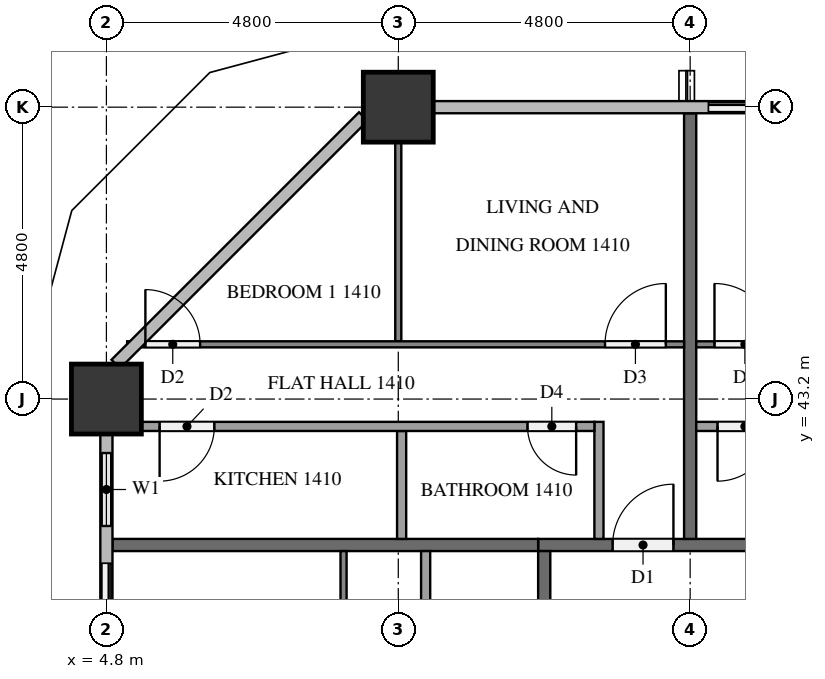
"""IFC4 building model, lengths in metres.
Left out: names, types, materials, properties, quantities, classifications, styles, units other than length and angle.
Written with IfcOpenShell. Run it as: python <this file> out.ifc"""

import sys

from ifc_helpers import new_model, si_unit, direction, frame, frame_2d, origin, origin_2d, place, context, subcontext, project, spatial, rectangle, extrude, element, fill, save


model = new_model("IFC4")
c1 = context("Model", 3, precision=1e-05, world=origin(), true_north=direction((0.0, 1.0)))
c2 = subcontext(c1, "Body", "Model", "MODEL_VIEW")
j1 = project(units=[si_unit("LENGTHUNIT", "METRE"), si_unit("PLANEANGLEUNIT", "RADIAN")], contexts=[c1])
p1 = place(None, origin())
s1 = spatial("IfcSite", under=j1, at=p1, CompositionType="ELEMENT")
p2 = place(p1, origin())
s2 = spatial("IfcBuilding", under=s1, at=p2, CompositionType="ELEMENT")
p3 = place(p2, frame((0.0, 0.0, 59.3)))
s3 = spatial("IfcBuildingStorey", under=s2, at=p3, CompositionType="ELEMENT", Elevation=59.3)
for number, where, z_axis, x_axis in (
    (1, (9.6, 48.0, 0.0), (0.0, 0.0, 1.0), (1.0, 0.0, 0.0)),
    (2, (4.8, 43.2, 0.0), (0.0, 0.0, 1.0), (1.0, 0.0, 0.0)),
):
    element("IfcColumn", number, at=place(p3, frame(where, z_axis=z_axis, x_axis=x_axis)), inside=s3, PredefinedType="COLUMN", context=c2, shape_type="SweptSolid", body=[
        extrude(rectangle(XDim=1.15, YDim=1.15, at=origin_2d()), origin(), (0.0, 0.0, 1.0), 3.2),
    ])
p4 = place(p3, frame((16.8, 48.0, 0.0), z_axis=(0.0, 0.0, 1.0), x_axis=(-1.0, 0.0, 0.0)))
e3 = element("IfcWall", 3, at=p4, inside=s3, PredefinedType="SOLIDWALL", context=c2, shape_type="SweptSolid", body=[
    extrude(rectangle(XDim=2.4, YDim=0.15, at=frame_2d((1.2, 0.0))), origin(), (0.0, 0.0, 1.0), 3.2),
])
p5 = place(p4, frame((0.3, 0.0, 0.0)))
e4 = element("IfcOpeningElement", 4, at=p5, cuts=e3, PredefinedType="OPENING", context=c2, shape_type="SweptSolid", body=[
    extrude(rectangle(XDim=1.8, YDim=2.4, at=frame_2d((0.9, 1.2))), frame((0.0, 0.085, 0.0), z_axis=(0.0, -1.0, 0.0), x_axis=(1.0, 0.0, 0.0)), (0.0, 0.0, 1.0), 0.17),
])
p6 = place(p3, frame((4.8, 42.625, 0.0), z_axis=(0.0, 0.0, 1.0), x_axis=(0.0, -1.0, 0.0)))
e5 = element("IfcWall", 5, at=p6, inside=s3, PredefinedType="SOLIDWALL", context=c2, shape_type="SweptSolid", body=[
    extrude(rectangle(XDim=4.225, YDim=0.15, at=frame_2d((2.113, 0.0))), origin(), (0.0, 0.0, 1.0), 3.2),
])
p7 = place(p6, frame((0.312, 0.0, 0.9)))
e6 = element("IfcOpeningElement", 6, at=p7, cuts=e5, PredefinedType="OPENING", context=c2, shape_type="SweptSolid", body=[
    extrude(rectangle(XDim=1.2, YDim=1.4, at=frame_2d((0.6, 0.7))), frame((0.0, 0.085, 0.0), z_axis=(0.0, -1.0, 0.0), x_axis=(1.0, 0.0, 0.0)), (0.0, 0.0, 1.0), 0.17),
])
p8 = place(p6, frame((2.125, 0.0, 0.0)))
e7 = element("IfcOpeningElement", 7, at=p8, cuts=e5, PredefinedType="OPENING", context=c2, shape_type="SweptSolid", body=[
    extrude(rectangle(XDim=1.8, YDim=2.4, at=frame_2d((0.9, 1.2))), frame((0.0, 0.085, 0.0), z_axis=(0.0, -1.0, 0.0), x_axis=(1.0, 0.0, 0.0)), (0.0, 0.0, 1.0), 0.17),
])
p9 = place(p3, frame((11.9, 40.8, 0.0), z_axis=(0.0, 0.0, 1.0), x_axis=(1.0, 0.0, 0.0)))
e8 = element("IfcWall", 8, at=p9, inside=s3, PredefinedType="PARTITIONING", context=c2, shape_type="SweptSolid", body=[
    extrude(rectangle(XDim=38.6, YDim=0.2, at=frame_2d((19.3, 0.0))), origin(), (0.0, 0.0, 1.0), 3.2),
])
p10 = place(p9, frame((36.375, 0.0, 0.0)))
e9 = element("IfcOpeningElement", 9, at=p10, cuts=e8, PredefinedType="OPENING", context=c2, shape_type="SweptSolid", body=[
    extrude(rectangle(XDim=1.0, YDim=2.1, at=frame_2d((0.5, 1.05))), frame((0.0, 0.11, 0.0), z_axis=(0.0, -1.0, 0.0), x_axis=(1.0, 0.0, 0.0)), (0.0, 0.0, 1.0), 0.22),
])
p11 = place(p9, frame((17.125, 0.0, 0.0)))
e10 = element("IfcOpeningElement", 10, at=p11, cuts=e8, PredefinedType="OPENING", context=c2, shape_type="SweptSolid", body=[
    extrude(rectangle(XDim=1.1, YDim=2.1, at=frame_2d((0.55, 1.05))), frame((0.0, 0.11, 0.0), z_axis=(0.0, -1.0, 0.0), x_axis=(1.0, 0.0, 0.0)), (0.0, 0.0, 1.0), 0.22),
])
p12 = place(p9, frame((15.625, 0.0, 0.0)))
e11 = element("IfcOpeningElement", 11, at=p12, cuts=e8, PredefinedType="OPENING", context=c2, shape_type="SweptSolid", body=[
    extrude(rectangle(XDim=1.0, YDim=2.1, at=frame_2d((0.5, 1.05))), frame((0.0, 0.11, 0.0), z_axis=(0.0, -1.0, 0.0), x_axis=(1.0, 0.0, 0.0)), (0.0, 0.0, 1.0), 0.22),
])
p13 = place(p9, frame((1.225, 0.0, 0.0)))
e12 = element("IfcOpeningElement", 12, at=p13, cuts=e8, PredefinedType="OPENING", context=c2, shape_type="SweptSolid", body=[
    extrude(rectangle(XDim=1.0, YDim=2.1, at=frame_2d((0.5, 1.05))), frame((0.0, 0.11, 0.0), z_axis=(0.0, -1.0, 0.0), x_axis=(1.0, 0.0, 0.0)), (0.0, 0.0, 1.0), 0.22),
])
p14 = place(p3, frame((12.0, 12.1, 0.0), z_axis=(0.0, 0.0, 1.0), x_axis=(0.0, 1.0, 0.0)))
e13 = element("IfcWall", 13, at=p14, inside=s3, PredefinedType="PARTITIONING", context=c2, shape_type="SweptSolid", body=[
    extrude(rectangle(XDim=28.6, YDim=0.2, at=frame_2d((14.3, 0.0))), origin(), (0.0, 0.0, 1.0), 3.2),
])
p15 = place(p14, frame((19.375, 0.0, 0.0)))
e14 = element("IfcOpeningElement", 14, at=p15, cuts=e13, PredefinedType="OPENING", context=c2, shape_type="SweptSolid", body=[
    extrude(rectangle(XDim=1.0, YDim=2.1, at=frame_2d((0.5, 1.05))), frame((0.0, 0.11, 0.0), z_axis=(0.0, -1.0, 0.0), x_axis=(1.0, 0.0, 0.0)), (0.0, 0.0, 1.0), 0.22),
])
p16 = place(p14, frame((12.175, 0.0, 0.0)))
e15 = element("IfcOpeningElement", 15, at=p16, cuts=e13, PredefinedType="OPENING", context=c2, shape_type="SweptSolid", body=[
    extrude(rectangle(XDim=1.0, YDim=2.1, at=frame_2d((0.5, 1.05))), frame((0.0, 0.11, 0.0), z_axis=(0.0, -1.0, 0.0), x_axis=(1.0, 0.0, 0.0)), (0.0, 0.0, 1.0), 0.22),
])
p17 = place(p14, frame((2.575, 0.0, 0.0)))
e16 = element("IfcOpeningElement", 16, at=p17, cuts=e13, PredefinedType="OPENING", context=c2, shape_type="SweptSolid", body=[
    extrude(rectangle(XDim=1.0, YDim=2.1, at=frame_2d((0.5, 1.05))), frame((0.0, 0.11, 0.0), z_axis=(0.0, -1.0, 0.0), x_axis=(1.0, 0.0, 0.0)), (0.0, 0.0, 1.0), 0.22),
])
p18 = place(p14, frame((1.025, 0.0, 0.0)))
e17 = element("IfcOpeningElement", 17, at=p18, cuts=e13, PredefinedType="OPENING", context=c2, shape_type="SweptSolid", body=[
    extrude(rectangle(XDim=1.0, YDim=2.1, at=frame_2d((0.5, 1.05))), frame((0.0, 0.11, 0.0), z_axis=(0.0, -1.0, 0.0), x_axis=(1.0, 0.0, 0.0)), (0.0, 0.0, 1.0), 0.22),
])
for number, where, z_axis, x_axis in (
    (18, (14.4, 47.9, 0.0), (0.0, 0.0, 1.0), (0.0, -1.0, 0.0)),
    (19, (4.9, 40.8, 0.0), (0.0, 0.0, 1.0), (1.0, 0.0, 0.0)),
):
    element("IfcWall", number, at=place(p3, frame(where, z_axis=z_axis, x_axis=x_axis)), inside=s3, PredefinedType="PARTITIONING", context=c2, shape_type="SweptSolid", body=[
        extrude(rectangle(XDim=7.0, YDim=0.2, at=frame_2d((3.5, 0.0))), origin(), (0.0, 0.0, 1.0), 3.2),
    ])
p19 = place(p3, frame((14.5, 44.1, 0.0), z_axis=(0.0, 0.0, 1.0), x_axis=(1.0, 0.0, 0.0)))
e20 = element("IfcWall", 20, at=p19, inside=s3, PredefinedType="PARTITIONING", context=c2, shape_type="SweptSolid", body=[
    extrude(rectangle(XDim=14.2, YDim=0.1, at=frame_2d((7.1, 0.0))), origin(), (0.0, 0.0, 1.0), 3.2),
])
p20 = place(p19, frame((9.85, 0.0, 0.0)))
e21 = element("IfcOpeningElement", 21, at=p20, cuts=e20, PredefinedType="OPENING", context=c2, shape_type="SweptSolid", body=[
    extrude(rectangle(XDim=0.9, YDim=2.1, at=frame_2d((0.45, 1.05))), frame((0.0, 0.06, 0.0), z_axis=(0.0, -1.0, 0.0), x_axis=(1.0, 0.0, 0.0)), (0.0, 0.0, 1.0), 0.12),
])
p21 = place(p19, frame((8.25, 0.0, 0.0)))
e22 = element("IfcOpeningElement", 22, at=p21, cuts=e20, PredefinedType="OPENING", context=c2, shape_type="SweptSolid", body=[
    extrude(rectangle(XDim=0.9, YDim=2.1, at=frame_2d((0.45, 1.05))), frame((0.0, 0.06, 0.0), z_axis=(0.0, -1.0, 0.0), x_axis=(1.0, 0.0, 0.0)), (0.0, 0.0, 1.0), 0.12),
])
p22 = place(p19, frame((0.3, 0.0, 0.0)))
e23 = element("IfcOpeningElement", 23, at=p22, cuts=e20, PredefinedType="OPENING", context=c2, shape_type="SweptSolid", body=[
    extrude(rectangle(XDim=1.0, YDim=2.1, at=frame_2d((0.5, 1.05))), frame((0.0, 0.06, 0.0), z_axis=(0.0, -1.0, 0.0), x_axis=(1.0, 0.0, 0.0)), (0.0, 0.0, 1.0), 0.12),
])
p23 = place(p3, frame((27.225, 42.75, 0.0), z_axis=(0.0, 0.0, 1.0), x_axis=(-1.0, 0.0, 0.0)))
e24 = element("IfcWall", 24, at=p23, inside=s3, PredefinedType="PARTITIONING", context=c2, shape_type="SweptSolid", body=[
    extrude(rectangle(XDim=12.725, YDim=0.15, at=frame_2d((6.363, 0.0))), origin(), (0.0, 0.0, 1.0), 3.2),
])
p24 = place(p23, frame((1.812, 0.0, 0.0)))
e25 = element("IfcOpeningElement", 25, at=p24, cuts=e24, PredefinedType="OPENING", context=c2, shape_type="SweptSolid", body=[
    extrude(rectangle(XDim=0.8, YDim=2.1, at=frame_2d((0.4, 1.05))), frame((0.0, 0.085, 0.0), z_axis=(0.0, -1.0, 0.0), x_axis=(1.0, 0.0, 0.0)), (0.0, 0.0, 1.0), 0.17),
])
p25 = place(p23, frame((3.261, 0.0, 0.0)))
e26 = element("IfcOpeningElement", 26, at=p25, cuts=e24, PredefinedType="OPENING", context=c2, shape_type="SweptSolid", body=[
    extrude(rectangle(XDim=0.9, YDim=2.1, at=frame_2d((0.45, 1.05))), frame((0.0, 0.085, 0.0), z_axis=(0.0, -1.0, 0.0), x_axis=(1.0, 0.0, 0.0)), (0.0, 0.0, 1.0), 0.17),
])
p26 = place(p23, frame((11.475, 0.0, 0.0)))
e27 = element("IfcOpeningElement", 27, at=p26, cuts=e24, PredefinedType="OPENING", context=c2, shape_type="SweptSolid", body=[
    extrude(rectangle(XDim=0.9, YDim=2.1, at=frame_2d((0.45, 1.05))), frame((0.0, 0.085, 0.0), z_axis=(0.0, -1.0, 0.0), x_axis=(1.0, 0.0, 0.0)), (0.0, 0.0, 1.0), 0.17),
])
p27 = place(p3, frame((9.6, 44.15, 0.0), z_axis=(0.0, 0.0, 1.0), x_axis=(0.0, 1.0, 0.0)))
e28 = element("IfcWall", 28, at=p27, inside=s3, PredefinedType="PARTITIONING", context=c2, shape_type="SweptSolid", body=[
    extrude(rectangle(XDim=3.275, YDim=0.1, at=frame_2d((1.638, 0.0))), origin(), (0.0, 0.0, 1.0), 3.2),
])
p28 = place(p3, frame((5.141, 44.1, 0.0), z_axis=(0.0, 0.0, 1.0), x_axis=(1.0, 0.0, 0.0)))
e29 = element("IfcWall", 29, at=p28, inside=s3, PredefinedType="PARTITIONING", context=c2, shape_type="SweptSolid", body=[
    extrude(rectangle(XDim=9.159, YDim=0.1, at=frame_2d((4.58, 0.0))), origin(), (0.0, 0.0, 1.0), 3.2),
])
p29 = place(p28, frame((7.859, 0.0, 0.0)))
e30 = element("IfcOpeningElement", 30, at=p29, cuts=e29, PredefinedType="OPENING", context=c2, shape_type="SweptSolid", body=[
    extrude(rectangle(XDim=1.0, YDim=2.1, at=frame_2d((0.5, 1.05))), frame((0.0, 0.06, 0.0), z_axis=(0.0, -1.0, 0.0), x_axis=(1.0, 0.0, 0.0)), (0.0, 0.0, 1.0), 0.12),
])
p30 = place(p28, frame((0.3, 0.0, 0.0)))
e31 = element("IfcOpeningElement", 31, at=p30, cuts=e29, PredefinedType="OPENING", context=c2, shape_type="SweptSolid", body=[
    extrude(rectangle(XDim=0.9, YDim=2.1, at=frame_2d((0.45, 1.05))), frame((0.0, 0.06, 0.0), z_axis=(0.0, -1.0, 0.0), x_axis=(1.0, 0.0, 0.0)), (0.0, 0.0, 1.0), 0.12),
])
p31 = place(p3, frame((9.655, 40.9, 0.0), z_axis=(0.0, 0.0, 1.0), x_axis=(0.0, 1.0, 0.0)))
e32 = element("IfcWall", 32, at=p31, inside=s3, PredefinedType="PARTITIONING", context=c2, shape_type="SweptSolid", body=[
    extrude(rectangle(XDim=1.775, YDim=0.15, at=frame_2d((0.888, 0.0))), origin(), (0.0, 0.0, 1.0), 3.2),
])
p32 = place(p3, frame((12.9, 40.9, 0.0), z_axis=(0.0, 0.0, 1.0), x_axis=(0.0, 1.0, 0.0)))
e33 = element("IfcWall", 33, at=p32, inside=s3, PredefinedType="PARTITIONING", context=c2, shape_type="SweptSolid", body=[
    extrude(rectangle(XDim=1.925, YDim=0.15, at=frame_2d((0.962, 0.0))), origin(), (0.0, 0.0, 1.0), 3.2),
])
p33 = place(p3, frame((12.825, 42.75, 0.0), z_axis=(0.0, 0.0, 1.0), x_axis=(-1.0, 0.0, 0.0)))
e34 = element("IfcWall", 34, at=p33, inside=s3, PredefinedType="PARTITIONING", context=c2, shape_type="SweptSolid", body=[
    extrude(rectangle(XDim=7.45, YDim=0.15, at=frame_2d((3.725, 0.0))), origin(), (0.0, 0.0, 1.0), 3.2),
])
p34 = place(p33, frame((0.3, 0.0, 0.0)))
e35 = element("IfcOpeningElement", 35, at=p34, cuts=e34, PredefinedType="OPENING", context=c2, shape_type="SweptSolid", body=[
    extrude(rectangle(XDim=0.8, YDim=2.1, at=frame_2d((0.4, 1.05))), frame((0.0, 0.085, 0.0), z_axis=(0.0, -1.0, 0.0), x_axis=(1.0, 0.0, 0.0)), (0.0, 0.0, 1.0), 0.17),
])
p35 = place(p33, frame((6.25, 0.0, 0.0)))
e36 = element("IfcOpeningElement", 36, at=p35, cuts=e34, PredefinedType="OPENING", context=c2, shape_type="SweptSolid", body=[
    extrude(rectangle(XDim=0.9, YDim=2.1, at=frame_2d((0.45, 1.05))), frame((0.0, 0.085, 0.0), z_axis=(0.0, -1.0, 0.0), x_axis=(1.0, 0.0, 0.0)), (0.0, 0.0, 1.0), 0.17),
])
p36 = place(p3, frame((8.7, 31.3, 0.0), z_axis=(0.0, 0.0, 1.0), x_axis=(0.0, 1.0, 0.0)))
e37 = element("IfcWall", 37, at=p36, inside=s3, PredefinedType="PARTITIONING", context=c2, shape_type="SweptSolid", body=[
    extrude(rectangle(XDim=9.4, YDim=0.1, at=frame_2d((4.7, 0.0))), origin(), (0.0, 0.0, 1.0), 3.2),
])
p37 = place(p36, frame((3.45, 0.0, 0.0)))
e38 = element("IfcOpeningElement", 38, at=p37, cuts=e37, PredefinedType="OPENING", context=c2, shape_type="SweptSolid", body=[
    extrude(rectangle(XDim=0.9, YDim=2.1, at=frame_2d((0.45, 1.05))), frame((0.0, 0.06, 0.0), z_axis=(0.0, -1.0, 0.0), x_axis=(1.0, 0.0, 0.0)), (0.0, 0.0, 1.0), 0.12),
])
p38 = place(p36, frame((5.05, 0.0, 0.0)))
e39 = element("IfcOpeningElement", 39, at=p38, cuts=e37, PredefinedType="OPENING", context=c2, shape_type="SweptSolid", body=[
    extrude(rectangle(XDim=1.0, YDim=2.1, at=frame_2d((0.5, 1.05))), frame((0.0, 0.06, 0.0), z_axis=(0.0, -1.0, 0.0), x_axis=(1.0, 0.0, 0.0)), (0.0, 0.0, 1.0), 0.12),
])
p39 = place(p3, frame((10.05, 40.7, 0.0), z_axis=(0.0, 0.0, 1.0), x_axis=(0.0, -1.0, 0.0)))
e40 = element("IfcWall", 40, at=p39, inside=s3, PredefinedType="PARTITIONING", context=c2, shape_type="SweptSolid", body=[
    extrude(rectangle(XDim=7.925, YDim=0.15, at=frame_2d((3.962, 0.0))), origin(), (0.0, 0.0, 1.0), 3.2),
])
p40 = place(p39, frame((5.08, 0.0, 0.0)))
e41 = element("IfcOpeningElement", 41, at=p40, cuts=e40, PredefinedType="OPENING", context=c2, shape_type="SweptSolid", body=[
    extrude(rectangle(XDim=0.8, YDim=2.1, at=frame_2d((0.4, 1.05))), frame((0.0, 0.085, 0.0), z_axis=(0.0, -1.0, 0.0), x_axis=(1.0, 0.0, 0.0)), (0.0, 0.0, 1.0), 0.17),
])
p41 = place(p39, frame((3.53, 0.0, 0.0)))
e42 = element("IfcOpeningElement", 42, at=p41, cuts=e40, PredefinedType="OPENING", context=c2, shape_type="SweptSolid", body=[
    extrude(rectangle(XDim=0.9, YDim=2.1, at=frame_2d((0.45, 1.05))), frame((0.0, 0.085, 0.0), z_axis=(0.0, -1.0, 0.0), x_axis=(1.0, 0.0, 0.0)), (0.0, 0.0, 1.0), 0.17),
])
p42 = place(p5, origin())
e43 = element("IfcDoor", 43, at=p42, inside=s3, OperationType="SLIDING_TO_LEFT", PredefinedType="DOOR", context=c2, shape_type="SweptSolid", body=[
    extrude(rectangle(XDim=1.8, YDim=2.4, at=frame_2d((0.9, 1.2))), frame((0.0, 0.025, 0.0), z_axis=(0.0, -1.0, 0.0), x_axis=(1.0, 0.0, 0.0)), (0.0, 0.0, 1.0), 0.05),
])
fill(e4, e43)
p43 = place(p7, origin())
e44 = element("IfcWindow", 44, at=p43, inside=s3, PartitioningType="SINGLE_PANEL", PredefinedType="WINDOW", context=c2, shape_type="SweptSolid", body=[
    extrude(rectangle(XDim=1.2, YDim=1.4, at=frame_2d((0.6, 0.7))), frame((0.0, 0.03, 0.0), z_axis=(0.0, -1.0, 0.0), x_axis=(1.0, 0.0, 0.0)), (0.0, 0.0, 1.0), 0.06),
])
fill(e6, e44)
p44 = place(p8, origin())
e45 = element("IfcDoor", 45, at=p44, inside=s3, OperationType="SLIDING_TO_RIGHT", PredefinedType="DOOR", context=c2, shape_type="SweptSolid", body=[
    extrude(rectangle(XDim=1.8, YDim=2.4, at=frame_2d((0.9, 1.2))), frame((0.0, 0.025, 0.0), z_axis=(0.0, -1.0, 0.0), x_axis=(1.0, 0.0, 0.0)), (0.0, 0.0, 1.0), 0.05),
])
fill(e7, e45)
p45 = place(p13, origin())
e46 = element("IfcDoor", 46, at=p45, inside=s3, OperationType="SINGLE_SWING_RIGHT", PredefinedType="DOOR", context=c2, shape_type="SweptSolid", body=[
    extrude(rectangle(XDim=1.0, YDim=2.1, at=frame_2d((0.5, 1.05))), frame((0.0, 0.025, 0.0), z_axis=(0.0, -1.0, 0.0), x_axis=(1.0, 0.0, 0.0)), (0.0, 0.0, 1.0), 0.05),
])
fill(e12, e46)
p46 = place(p22, origin())
e47 = element("IfcDoor", 47, at=p46, inside=s3, OperationType="SINGLE_SWING_LEFT", PredefinedType="DOOR", context=c2, shape_type="SweptSolid", body=[
    extrude(rectangle(XDim=1.0, YDim=2.1, at=frame_2d((0.5, 1.05))), frame((0.0, 0.025, 0.0), z_axis=(0.0, -1.0, 0.0), x_axis=(1.0, 0.0, 0.0)), (0.0, 0.0, 1.0), 0.05),
])
fill(e23, e47)
p47 = place(p26, origin())
e48 = element("IfcDoor", 48, at=p47, inside=s3, OperationType="SINGLE_SWING_RIGHT", PredefinedType="DOOR", context=c2, shape_type="SweptSolid", body=[
    extrude(rectangle(XDim=0.9, YDim=2.1, at=frame_2d((0.45, 1.05))), frame((0.0, 0.025, 0.0), z_axis=(0.0, -1.0, 0.0), x_axis=(1.0, 0.0, 0.0)), (0.0, 0.0, 1.0), 0.05),
])
fill(e27, e48)
p48 = place(p29, origin())
e49 = element("IfcDoor", 49, at=p48, inside=s3, OperationType="SINGLE_SWING_RIGHT", PredefinedType="DOOR", context=c2, shape_type="SweptSolid", body=[
    extrude(rectangle(XDim=1.0, YDim=2.1, at=frame_2d((0.5, 1.05))), frame((0.0, 0.025, 0.0), z_axis=(0.0, -1.0, 0.0), x_axis=(1.0, 0.0, 0.0)), (0.0, 0.0, 1.0), 0.05),
])
fill(e30, e49)
p49 = place(p30, origin())
e50 = element("IfcDoor", 50, at=p49, inside=s3, OperationType="SINGLE_SWING_LEFT", PredefinedType="DOOR", context=c2, shape_type="SweptSolid", body=[
    extrude(rectangle(XDim=0.9, YDim=2.1, at=frame_2d((0.45, 1.05))), frame((0.0, 0.025, 0.0), z_axis=(0.0, -1.0, 0.0), x_axis=(1.0, 0.0, 0.0)), (0.0, 0.0, 1.0), 0.05),
])
fill(e31, e50)
p50 = place(p34, origin())
e51 = element("IfcDoor", 51, at=p50, inside=s3, OperationType="SINGLE_SWING_LEFT", PredefinedType="DOOR", context=c2, shape_type="SweptSolid", body=[
    extrude(rectangle(XDim=0.8, YDim=2.1, at=frame_2d((0.4, 1.05))), frame((0.0, 0.025, 0.0), z_axis=(0.0, -1.0, 0.0), x_axis=(1.0, 0.0, 0.0)), (0.0, 0.0, 1.0), 0.05),
])
fill(e35, e51)
p51 = place(p35, origin())
e52 = element("IfcDoor", 52, at=p51, inside=s3, OperationType="SINGLE_SWING_RIGHT", PredefinedType="DOOR", context=c2, shape_type="SweptSolid", body=[
    extrude(rectangle(XDim=0.9, YDim=2.1, at=frame_2d((0.45, 1.05))), frame((0.0, 0.025, 0.0), z_axis=(0.0, -1.0, 0.0), x_axis=(1.0, 0.0, 0.0)), (0.0, 0.0, 1.0), 0.05),
])
fill(e36, e52)
save(model, sys.argv[1])
